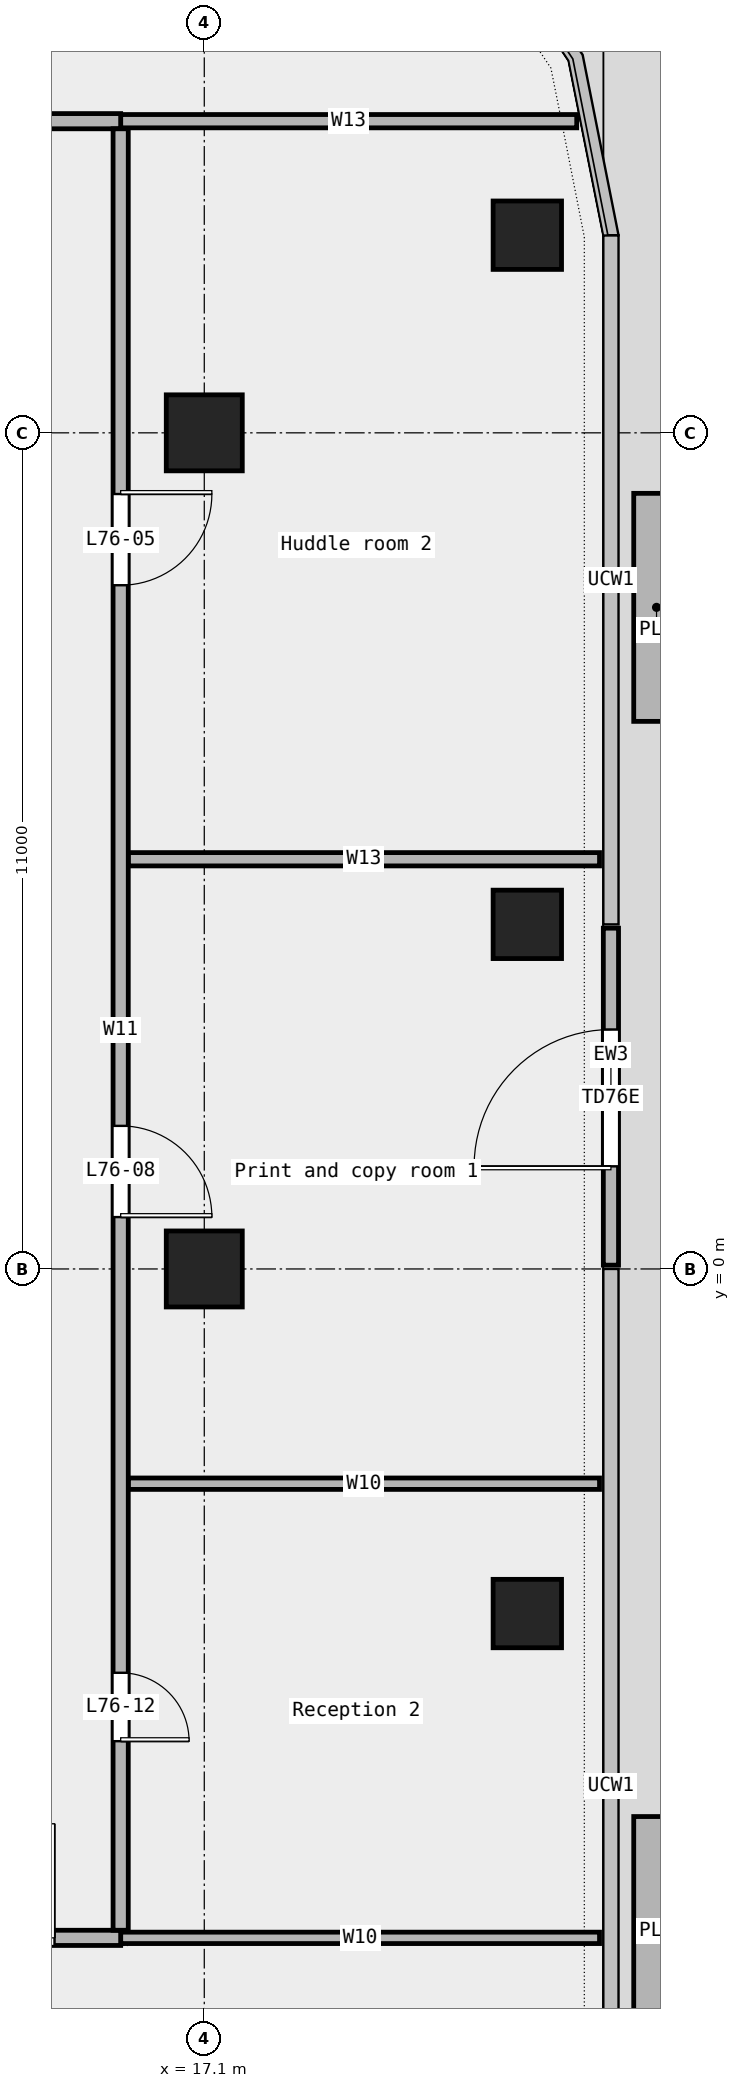
"""IFC4 building model, lengths in metres.
Left out: names, types, materials, properties, quantities, classifications, styles, units other than length and angle.
Written with IfcOpenShell. Run it as: python <this file> out.ifc"""

import sys

from ifc_helpers import new_model, si_unit, direction, frame, frame_2d, origin, origin_2d, place, context, subcontext, project, spatial, rectangle, extrude, element, fill, save


model = new_model("IFC4")
c1 = context("Model", 3, precision=1e-05, world=origin(), true_north=direction((0.0, 1.0)))
c2 = subcontext(c1, "Body", "Model", "MODEL_VIEW")
j1 = project(units=[si_unit("LENGTHUNIT", "METRE"), si_unit("PLANEANGLEUNIT", "RADIAN")], contexts=[c1])
p1 = place(None, origin())
s1 = spatial("IfcSite", under=j1, at=p1, CompositionType="ELEMENT")
p2 = place(p1, origin())
s2 = spatial("IfcBuilding", under=s1, at=p2, CompositionType="ELEMENT")
p3 = place(p2, frame((0.0, 0.0, 349.4)))
s3 = spatial("IfcBuildingStorey", under=s2, at=p3, CompositionType="ELEMENT", Elevation=349.4)
for number, where, z_axis, x_axis in (
    (1, (21.35, -4.533, 0.0), (0.0, 0.0, 1.0), (1.0, 0.0, 0.0)),
    (2, (21.35, 4.533, 0.0), (0.0, 0.0, 1.0), (1.0, 0.0, 0.0)),
    (3, (21.35, 13.6, 0.0), (0.0, 0.0, 1.0), (1.0, 0.0, 0.0)),
):
    element("IfcColumn", number, at=place(p3, frame(where, z_axis=z_axis, x_axis=x_axis)), inside=s3, PredefinedType="COLUMN", context=c2, shape_type="SweptSolid", body=[
        extrude(rectangle(XDim=0.9, YDim=0.9, at=origin_2d()), origin(), (0.0, 0.0, 1.0), 3.65),
    ])
for number, where, z_axis, x_axis in (
    (4, (17.1, 0.0, 0.0), (0.0, 0.0, 1.0), (1.0, 0.0, 0.0)),
    (5, (17.1, 11.0, 0.0), (0.0, 0.0, 1.0), (1.0, 0.0, 0.0)),
):
    element("IfcColumn", number, at=place(p3, frame(where, z_axis=z_axis, x_axis=x_axis)), inside=s3, PredefinedType="COLUMN", context=c2, shape_type="SweptSolid", body=[
        extrude(rectangle(XDim=1.0, YDim=1.0, at=origin_2d()), origin(), (0.0, 0.0, 1.0), 3.65),
    ])
p4 = place(p3, frame((22.45, 0.05, 0.0), z_axis=(0.0, 0.0, 1.0), x_axis=(0.0, 1.0, 0.0)))
e6 = element("IfcWall", 6, at=p4, inside=s3, PredefinedType="STANDARD", context=c2, shape_type="SweptSolid", body=[
    extrude(rectangle(XDim=4.433, YDim=0.2, at=frame_2d((2.217, 0.0))), origin(), (0.0, 0.0, 1.0), 3.65),
])
p5 = place(p4, frame((1.3, 0.0, 0.0)))
e7 = element("IfcOpeningElement", 7, at=p5, cuts=e6, PredefinedType="OPENING", context=c2, shape_type="SweptSolid", body=[
    extrude(rectangle(XDim=1.8, YDim=2.4, at=frame_2d((0.9, 1.2))), frame((0.0, 0.112, 0.0), z_axis=(0.0, -1.0, 0.0), x_axis=(1.0, 0.0, 0.0)), (0.0, 0.0, 1.0), 0.224),
])
for number, where, z_axis, x_axis in (
    (8, (23.05, -10.204, 0.0), (0.0, 0.0, 1.0), (0.0, 1.0, 0.0)),
    (9, (23.05, 7.204, 0.0), (0.0, 0.0, 1.0), (0.0, 1.0, 0.0)),
):
    element("IfcWall", number, at=place(p3, frame(where, z_axis=z_axis, x_axis=x_axis)), inside=s3, PredefinedType="STANDARD", context=c2, shape_type="SweptSolid", body=[
        extrude(rectangle(XDim=3.0, YDim=0.6, at=frame_2d((1.5, 0.0))), origin(), (0.0, 0.0, 1.0), 0.7),
    ])
p6 = place(p3, frame((16.0, -8.8, 0.0), z_axis=(0.0, 0.0, 1.0), x_axis=(1.0, 0.0, 0.0)))
e10 = element("IfcWall", 10, at=p6, inside=s3, PredefinedType="PARTITIONING", context=c2, shape_type="SweptSolid", body=[
    extrude(rectangle(XDim=6.3, YDim=0.15, at=frame_2d((3.15, 0.0))), origin(), (0.0, 0.0, 1.0), 3.65),
])
p7 = place(p3, frame((-16.0, -8.8, 0.0), z_axis=(0.0, 0.0, 1.0), x_axis=(1.0, 0.0, 0.0)))
e11 = element("IfcWall", 11, at=p7, inside=s3, PredefinedType="PARTITIONING", context=c2, shape_type="SweptSolid", body=[
    extrude(rectangle(XDim=32.0, YDim=0.2, at=frame_2d((16.0, 0.0))), origin(), (0.0, 0.0, 1.0), 3.65),
])
p8 = place(p7, frame((6.995, 0.0, 0.0)))
e12 = element("IfcOpeningElement", 12, at=p8, cuts=e11, PredefinedType="OPENING", context=c2, shape_type="SweptSolid", body=[
    extrude(rectangle(XDim=1.2, YDim=2.1, at=frame_2d((0.6, 1.05))), frame((0.0, 0.112, 0.0), z_axis=(0.0, -1.0, 0.0), x_axis=(1.0, 0.0, 0.0)), (0.0, 0.0, 1.0), 0.224),
])
p9 = place(p7, frame((22.407, 0.0, 0.0)))
e13 = element("IfcOpeningElement", 13, at=p9, cuts=e11, PredefinedType="OPENING", context=c2, shape_type="SweptSolid", body=[
    extrude(rectangle(XDim=1.5, YDim=2.1, at=frame_2d((0.75, 1.05))), frame((0.0, 0.112, 0.0), z_axis=(0.0, -1.0, 0.0), x_axis=(1.0, 0.0, 0.0)), (0.0, 0.0, 1.0), 0.224),
])
p10 = place(p7, frame((29.63, 0.0, 0.0)))
e14 = element("IfcOpeningElement", 14, at=p10, cuts=e11, PredefinedType="OPENING", context=c2, shape_type="SweptSolid", body=[
    extrude(rectangle(XDim=1.5, YDim=2.1, at=frame_2d((0.75, 1.05))), frame((0.0, 0.112, 0.0), z_axis=(0.0, -1.0, 0.0), x_axis=(1.0, 0.0, 0.0)), (0.0, 0.0, 1.0), 0.224),
])
p11 = place(p7, frame((1.18, 0.0, 0.0)))
e15 = element("IfcOpeningElement", 15, at=p11, cuts=e11, PredefinedType="OPENING", context=c2, shape_type="SweptSolid", body=[
    extrude(rectangle(XDim=1.5, YDim=2.1, at=frame_2d((0.75, 1.05))), frame((0.0, 0.112, 0.0), z_axis=(0.0, -1.0, 0.0), x_axis=(1.0, 0.0, 0.0)), (0.0, 0.0, 1.0), 0.224),
])
p12 = place(p7, frame((13.843, 0.0, 0.0)))
e16 = element("IfcOpeningElement", 16, at=p12, cuts=e11, PredefinedType="OPENING", context=c2, shape_type="SweptSolid", body=[
    extrude(rectangle(XDim=1.2, YDim=2.1, at=frame_2d((0.6, 1.05))), frame((0.0, 0.112, 0.0), z_axis=(0.0, -1.0, 0.0), x_axis=(1.0, 0.0, 0.0)), (0.0, 0.0, 1.0), 0.224),
])
p13 = place(p3, frame((16.1, -2.825, 0.0), z_axis=(0.0, 0.0, 1.0), x_axis=(1.0, 0.0, 0.0)))
e17 = element("IfcWall", 17, at=p13, inside=s3, PredefinedType="PARTITIONING", context=c2, shape_type="SweptSolid", body=[
    extrude(rectangle(XDim=6.2, YDim=0.15, at=frame_2d((3.1, 0.0))), origin(), (0.0, 0.0, 1.0), 3.65),
])
p14 = place(p3, frame((16.1, 5.39, 0.0), z_axis=(0.0, 0.0, 1.0), x_axis=(1.0, 0.0, 0.0)))
e18 = element("IfcWall", 18, at=p14, inside=s3, PredefinedType="PARTITIONING", context=c2, shape_type="SweptSolid", body=[
    extrude(rectangle(XDim=6.2, YDim=0.175, at=frame_2d((3.1, 0.0))), origin(), (0.0, 0.0, 1.0), 3.65),
])
p15 = place(p3, frame((16.0, 15.1, 0.0), z_axis=(0.0, 0.0, 1.0), x_axis=(1.0, 0.0, 0.0)))
e19 = element("IfcWall", 19, at=p15, inside=s3, PredefinedType="PARTITIONING", context=c2, shape_type="SweptSolid", body=[
    extrude(rectangle(XDim=6.0, YDim=0.175, at=frame_2d((3.0, 0.0))), origin(), (0.0, 0.0, 1.0), 3.65),
])
p16 = place(p3, frame((-16.0, 15.1, 0.0), z_axis=(0.0, 0.0, 1.0), x_axis=(1.0, 0.0, 0.0)))
e20 = element("IfcWall", 20, at=p16, inside=s3, PredefinedType="PARTITIONING", context=c2, shape_type="SweptSolid", body=[
    extrude(rectangle(XDim=32.0, YDim=0.2, at=frame_2d((16.0, 0.0))), origin(), (0.0, 0.0, 1.0), 3.65),
])
p17 = place(p16, frame((17.24, 0.0, 0.0)))
e21 = element("IfcOpeningElement", 21, at=p17, cuts=e20, PredefinedType="OPENING", context=c2, shape_type="SweptSolid", body=[
    extrude(rectangle(XDim=1.2, YDim=2.1, at=frame_2d((0.6, 1.05))), frame((0.0, 0.112, 0.0), z_axis=(0.0, -1.0, 0.0), x_axis=(1.0, 0.0, 0.0)), (0.0, 0.0, 1.0), 0.224),
])
p18 = place(p16, frame((27.183, 0.0, 0.0)))
e22 = element("IfcOpeningElement", 22, at=p18, cuts=e20, PredefinedType="OPENING", context=c2, shape_type="SweptSolid", body=[
    extrude(rectangle(XDim=1.0, YDim=2.1, at=frame_2d((0.5, 1.05))), frame((0.0, 0.112, 0.0), z_axis=(0.0, -1.0, 0.0), x_axis=(1.0, 0.0, 0.0)), (0.0, 0.0, 1.0), 0.224),
])
p19 = place(p16, frame((5.657, 0.0, 0.0)))
e23 = element("IfcOpeningElement", 23, at=p19, cuts=e20, PredefinedType="OPENING", context=c2, shape_type="SweptSolid", body=[
    extrude(rectangle(XDim=1.0, YDim=2.1, at=frame_2d((0.5, 1.05))), frame((0.0, 0.112, 0.0), z_axis=(0.0, -1.0, 0.0), x_axis=(1.0, 0.0, 0.0)), (0.0, 0.0, 1.0), 0.224),
])
p20 = place(p3, frame((16.0, -8.7, 0.0), z_axis=(0.0, 0.0, 1.0), x_axis=(0.0, 1.0, 0.0)))
e24 = element("IfcWall", 24, at=p20, inside=s3, PredefinedType="PARTITIONING", context=c2, shape_type="SweptSolid", body=[
    extrude(rectangle(XDim=23.7, YDim=0.2, at=frame_2d((11.85, 0.0))), origin(), (0.0, 0.0, 1.0), 3.65),
])
p21 = place(p20, frame((17.695, 0.0, 0.0)))
e25 = element("IfcOpeningElement", 25, at=p21, cuts=e24, PredefinedType="OPENING", context=c2, shape_type="SweptSolid", body=[
    extrude(rectangle(XDim=1.2, YDim=2.1, at=frame_2d((0.6, 1.05))), frame((0.0, 0.112, 0.0), z_axis=(0.0, -1.0, 0.0), x_axis=(1.0, 0.0, 0.0)), (0.0, 0.0, 1.0), 0.224),
])
p22 = place(p20, frame((9.383, 0.0, 0.0)))
e26 = element("IfcOpeningElement", 26, at=p22, cuts=e24, PredefinedType="OPENING", context=c2, shape_type="SweptSolid", body=[
    extrude(rectangle(XDim=1.2, YDim=2.1, at=frame_2d((0.6, 1.05))), frame((0.0, 0.112, 0.0), z_axis=(0.0, -1.0, 0.0), x_axis=(1.0, 0.0, 0.0)), (0.0, 0.0, 1.0), 0.224),
])
p23 = place(p20, frame((2.488, 0.0, 0.0)))
e27 = element("IfcOpeningElement", 27, at=p23, cuts=e24, PredefinedType="OPENING", context=c2, shape_type="SweptSolid", body=[
    extrude(rectangle(XDim=0.9, YDim=2.1, at=frame_2d((0.45, 1.05))), frame((0.0, 0.112, 0.0), z_axis=(0.0, -1.0, 0.0), x_axis=(1.0, 0.0, 0.0)), (0.0, 0.0, 1.0), 0.224),
])
p24 = place(p5, origin())
e28 = element("IfcDoor", 28, at=p24, inside=s3, OperationType="DOUBLE_DOOR_SINGLE_SWING", PredefinedType="DOOR", context=c2, shape_type="SweptSolid", body=[
    extrude(rectangle(XDim=1.8, YDim=2.4, at=frame_2d((0.9, 1.2))), frame((0.0, 0.025, 0.0), z_axis=(0.0, -1.0, 0.0), x_axis=(1.0, 0.0, 0.0)), (0.0, 0.0, 1.0), 0.05),
])
fill(e7, e28)
p25 = place(p10, origin())
e29 = element("IfcDoor", 29, at=p25, inside=s3, OperationType="DOUBLE_DOOR_SINGLE_SWING", PredefinedType="DOOR", context=c2, shape_type="SweptSolid", body=[
    extrude(rectangle(XDim=1.5, YDim=2.1, at=frame_2d((0.75, 1.05))), frame((0.0, 0.025, 0.0), z_axis=(0.0, -1.0, 0.0), x_axis=(1.0, 0.0, 0.0)), (0.0, 0.0, 1.0), 0.05),
])
fill(e14, e29)
p26 = place(p21, origin())
e30 = element("IfcDoor", 30, at=p26, inside=s3, OperationType="SINGLE_SWING_LEFT", PredefinedType="DOOR", context=c2, shape_type="SweptSolid", body=[
    extrude(rectangle(XDim=1.2, YDim=2.1, at=frame_2d((0.6, 1.05))), frame((0.0, 0.025, 0.0), z_axis=(0.0, -1.0, 0.0), x_axis=(1.0, 0.0, 0.0)), (0.0, 0.0, 1.0), 0.05),
])
fill(e25, e30)
p27 = place(p22, origin())
e31 = element("IfcDoor", 31, at=p27, inside=s3, OperationType="SINGLE_SWING_RIGHT", PredefinedType="DOOR", context=c2, shape_type="SweptSolid", body=[
    extrude(rectangle(XDim=1.2, YDim=2.1, at=frame_2d((0.6, 1.05))), frame((0.0, 0.025, 0.0), z_axis=(0.0, -1.0, 0.0), x_axis=(1.0, 0.0, 0.0)), (0.0, 0.0, 1.0), 0.05),
])
fill(e26, e31)
p28 = place(p23, origin())
e32 = element("IfcDoor", 32, at=p28, inside=s3, OperationType="SINGLE_SWING_RIGHT", PredefinedType="DOOR", context=c2, shape_type="SweptSolid", body=[
    extrude(rectangle(XDim=0.9, YDim=2.1, at=frame_2d((0.45, 1.05))), frame((0.0, 0.025, 0.0), z_axis=(0.0, -1.0, 0.0), x_axis=(1.0, 0.0, 0.0)), (0.0, 0.0, 1.0), 0.05),
])
fill(e27, e32)
save(model, sys.argv[1])
